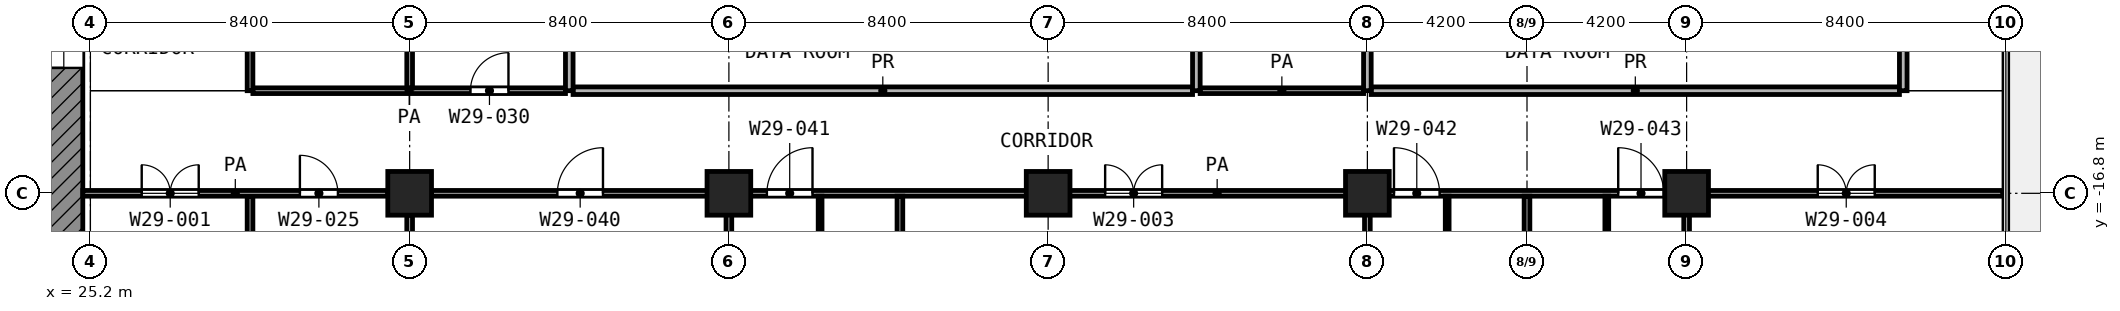
"""IFC4 building model, lengths in metres.
Left out: names, types, materials, properties, quantities, classifications, styles, units other than length and angle.
Written with IfcOpenShell. Run it as: python <this file> out.ifc"""

import sys

from ifc_helpers import new_model, si_unit, direction, frame, frame_2d, origin, origin_2d, place, context, subcontext, project, spatial, rectangle, extrude, element, fill, save


model = new_model("IFC4")
c1 = context("Model", 3, precision=1e-05, world=origin(), true_north=direction((0.0, 1.0)))
c2 = subcontext(c1, "Body", "Model", "MODEL_VIEW")
j1 = project(units=[si_unit("LENGTHUNIT", "METRE"), si_unit("PLANEANGLEUNIT", "RADIAN")], contexts=[c1])
p1 = place(None, origin())
s1 = spatial("IfcSite", under=j1, at=p1, CompositionType="ELEMENT")
p2 = place(p1, origin())
s2 = spatial("IfcBuilding", under=s1, at=p2, CompositionType="ELEMENT")
p3 = place(p2, frame((0.0, 0.0, 149.2)))
s3 = spatial("IfcBuildingStorey", under=s2, at=p3, CompositionType="ELEMENT", Elevation=149.2)
for number, where, z_axis, x_axis in (
    (1, (33.6, -16.8, 0.0), (0.0, 0.0, 1.0), (1.0, 0.0, 0.0)),
    (2, (42.0, -16.8, 0.0), (0.0, 0.0, 1.0), (1.0, 0.0, 0.0)),
    (3, (50.4, -16.8, 0.0), (0.0, 0.0, 1.0), (1.0, 0.0, 0.0)),
    (4, (58.8, -16.8, 0.0), (0.0, 0.0, 1.0), (1.0, 0.0, 0.0)),
    (5, (67.2, -16.8, 0.0), (0.0, 0.0, 1.0), (1.0, 0.0, 0.0)),
):
    element("IfcColumn", number, at=place(p3, frame(where, z_axis=z_axis, x_axis=x_axis)), inside=s3, PredefinedType="COLUMN", context=c2, shape_type="SweptSolid", body=[
        extrude(rectangle(XDim=1.15, YDim=1.15, at=origin_2d()), origin(), (0.0, 0.0, 1.0), 4.2),
    ])
p4 = place(p3, frame((24.5, -24.0, 0.0), z_axis=(0.0, 0.0, 1.0), x_axis=(0.0, 1.0, 0.0)))
e6 = element("IfcWall", 6, at=p4, inside=s3, PredefinedType="SHEAR", context=c2, shape_type="SweptSolid", body=[
    extrude(rectangle(XDim=18.6, YDim=1.0, at=frame_2d((9.3, 0.0))), origin(), (0.0, 0.0, 1.0), 3.7),
])
p5 = place(p4, frame((10.5, 0.0, 0.0)))
e7 = element("IfcOpeningElement", 7, at=p5, cuts=e6, PredefinedType="OPENING", context=c2, shape_type="SweptSolid", body=[
    extrude(rectangle(XDim=1.8, YDim=2.1, at=frame_2d((0.9, 1.05))), frame((0.0, 0.51, 0.0), z_axis=(0.0, -1.0, 0.0), x_axis=(1.0, 0.0, 0.0)), (0.0, 0.0, 1.0), 1.02),
])
for number, where, z_axis, x_axis in (
    (8, (44.4, -19.5, 0.0), (0.0, 0.0, 1.0), (0.0, 1.0, 0.0)),
    (9, (60.9, -19.5, 0.0), (0.0, 0.0, 1.0), (0.0, 1.0, 0.0)),
    (10, (65.1, -19.5, 0.0), (0.0, 0.0, 1.0), (0.0, 1.0, 0.0)),
):
    element("IfcWall", number, at=place(p3, frame(where, z_axis=z_axis, x_axis=x_axis)), inside=s3, PredefinedType="PARTITIONING", context=c2, shape_type="SweptSolid", body=[
        extrude(rectangle(XDim=2.625, YDim=0.1, at=frame_2d((1.312, 0.0))), origin(), (0.0, 0.0, 1.0), 3.7),
    ])
p6 = place(p3, frame((25.0, -16.8, 0.0), z_axis=(0.0, 0.0, 1.0), x_axis=(1.0, 0.0, 0.0)))
e11 = element("IfcWall", 11, at=p6, inside=s3, PredefinedType="PARTITIONING", context=c2, shape_type="SweptSolid", body=[
    extrude(rectangle(XDim=8.025, YDim=0.15, at=frame_2d((4.012, 0.0))), origin(), (0.0, 0.0, 1.0), 3.7),
])
p7 = place(p6, frame((1.55, 0.0, 0.0)))
e12 = element("IfcOpeningElement", 12, at=p7, cuts=e11, PredefinedType="OPENING", context=c2, shape_type="SweptSolid", body=[
    extrude(rectangle(XDim=1.5, YDim=2.1, at=frame_2d((0.75, 1.05))), frame((0.0, 0.085, 0.0), z_axis=(0.0, -1.0, 0.0), x_axis=(1.0, 0.0, 0.0)), (0.0, 0.0, 1.0), 0.17),
])
p8 = place(p6, frame((5.712, 0.0, 0.0)))
e13 = element("IfcOpeningElement", 13, at=p8, cuts=e11, PredefinedType="OPENING", context=c2, shape_type="SweptSolid", body=[
    extrude(rectangle(XDim=1.0, YDim=2.1, at=frame_2d((0.5, 1.05))), frame((0.0, 0.085, 0.0), z_axis=(0.0, -1.0, 0.0), x_axis=(1.0, 0.0, 0.0)), (0.0, 0.0, 1.0), 0.17),
])
p9 = place(p3, frame((34.175, -16.8, 0.0), z_axis=(0.0, 0.0, 1.0), x_axis=(1.0, 0.0, 0.0)))
e14 = element("IfcWall", 14, at=p9, inside=s3, PredefinedType="PARTITIONING", context=c2, shape_type="SweptSolid", body=[
    extrude(rectangle(XDim=41.345, YDim=0.15, at=frame_2d((20.672, 0.0))), origin(), (0.0, 0.0, 1.0), 3.7),
])
p10 = place(p9, frame((3.312, 0.0, 0.0)))
e15 = element("IfcOpeningElement", 15, at=p10, cuts=e14, PredefinedType="OPENING", context=c2, shape_type="SweptSolid", body=[
    extrude(rectangle(XDim=1.2, YDim=2.1, at=frame_2d((0.6, 1.05))), frame((0.0, 0.085, 0.0), z_axis=(0.0, -1.0, 0.0), x_axis=(1.0, 0.0, 0.0)), (0.0, 0.0, 1.0), 0.17),
])
p11 = place(p9, frame((8.825, 0.0, 0.0)))
e16 = element("IfcOpeningElement", 16, at=p11, cuts=e14, PredefinedType="OPENING", context=c2, shape_type="SweptSolid", body=[
    extrude(rectangle(XDim=1.2, YDim=2.1, at=frame_2d((0.6, 1.05))), frame((0.0, 0.085, 0.0), z_axis=(0.0, -1.0, 0.0), x_axis=(1.0, 0.0, 0.0)), (0.0, 0.0, 1.0), 0.17),
])
p12 = place(p9, frame((17.725, 0.0, 0.0)))
e17 = element("IfcOpeningElement", 17, at=p12, cuts=e14, PredefinedType="OPENING", context=c2, shape_type="SweptSolid", body=[
    extrude(rectangle(XDim=1.5, YDim=2.1, at=frame_2d((0.75, 1.05))), frame((0.0, 0.085, 0.0), z_axis=(0.0, -1.0, 0.0), x_axis=(1.0, 0.0, 0.0)), (0.0, 0.0, 1.0), 0.17),
])
p13 = place(p9, frame((25.325, 0.0, 0.0)))
e18 = element("IfcOpeningElement", 18, at=p13, cuts=e14, PredefinedType="OPENING", context=c2, shape_type="SweptSolid", body=[
    extrude(rectangle(XDim=1.2, YDim=2.1, at=frame_2d((0.6, 1.05))), frame((0.0, 0.085, 0.0), z_axis=(0.0, -1.0, 0.0), x_axis=(1.0, 0.0, 0.0)), (0.0, 0.0, 1.0), 0.17),
])
p14 = place(p9, frame((31.225, 0.0, 0.0)))
e19 = element("IfcOpeningElement", 19, at=p14, cuts=e14, PredefinedType="OPENING", context=c2, shape_type="SweptSolid", body=[
    extrude(rectangle(XDim=1.2, YDim=2.1, at=frame_2d((0.6, 1.05))), frame((0.0, 0.085, 0.0), z_axis=(0.0, -1.0, 0.0), x_axis=(1.0, 0.0, 0.0)), (0.0, 0.0, 1.0), 0.17),
])
p15 = place(p9, frame((36.475, 0.0, 0.0)))
e20 = element("IfcOpeningElement", 20, at=p15, cuts=e14, PredefinedType="OPENING", context=c2, shape_type="SweptSolid", body=[
    extrude(rectangle(XDim=1.5, YDim=2.1, at=frame_2d((0.75, 1.05))), frame((0.0, 0.085, 0.0), z_axis=(0.0, -1.0, 0.0), x_axis=(1.0, 0.0, 0.0)), (0.0, 0.0, 1.0), 0.17),
])
p16 = place(p3, frame((29.475, -14.1, 0.0), z_axis=(0.0, 0.0, 1.0), x_axis=(1.0, 0.0, 0.0)))
e21 = element("IfcWall", 21, at=p16, inside=s3, PredefinedType="PARTITIONING", context=c2, shape_type="SweptSolid", body=[
    extrude(rectangle(XDim=8.225, YDim=0.15, at=frame_2d((4.112, 0.0))), origin(), (0.0, 0.0, 1.0), 3.7),
])
p17 = place(p16, frame((5.725, 0.0, 0.0)))
e22 = element("IfcOpeningElement", 22, at=p17, cuts=e21, PredefinedType="OPENING", context=c2, shape_type="SweptSolid", body=[
    extrude(rectangle(XDim=1.0, YDim=2.1, at=frame_2d((0.5, 1.05))), frame((0.0, 0.085, 0.0), z_axis=(0.0, -1.0, 0.0), x_axis=(1.0, 0.0, 0.0)), (0.0, 0.0, 1.0), 0.17),
])
p18 = place(p3, frame((54.4, -14.1, 0.0), z_axis=(0.0, 0.0, 1.0), x_axis=(1.0, 0.0, 0.0)))
e23 = element("IfcWall", 23, at=p18, inside=s3, PredefinedType="PARTITIONING", context=c2, shape_type="SweptSolid", body=[
    extrude(rectangle(XDim=4.3, YDim=0.15, at=frame_2d((2.15, 0.0))), origin(), (0.0, 0.0, 1.0), 3.7),
])
p19 = place(p3, frame((29.4, -25.2, 0.0), z_axis=(0.0, 0.0, 1.0), x_axis=(0.0, 1.0, 0.0)))
e24 = element("IfcWall", 24, at=p19, inside=s3, PredefinedType="PARTITIONING", context=c2, shape_type="SweptSolid", body=[
    extrude(rectangle(XDim=8.325, YDim=0.15, at=frame_2d((4.163, 0.0))), origin(), (0.0, 0.0, 1.0), 3.7),
])
p20 = place(p3, frame((29.4, -14.1, 0.0), z_axis=(0.0, 0.0, 1.0), x_axis=(0.0, 1.0, 0.0)))
e25 = element("IfcWall", 25, at=p20, inside=s3, PredefinedType="PARTITIONING", context=c2, shape_type="SweptSolid", body=[
    extrude(rectangle(XDim=3.0, YDim=0.15, at=frame_2d((1.5, 0.0))), origin(), (0.0, 0.0, 1.0), 3.7),
])
p21 = place(p3, frame((33.6, -25.12, 0.0), z_axis=(0.0, 0.0, 1.0), x_axis=(0.0, 1.0, 0.0)))
e26 = element("IfcWall", 26, at=p21, inside=s3, PredefinedType="PARTITIONING", context=c2, shape_type="SweptSolid", body=[
    extrude(rectangle(XDim=7.745, YDim=0.15, at=frame_2d((3.873, 0.0))), origin(), (0.0, 0.0, 1.0), 3.7),
])
p22 = place(p3, frame((33.6, -14.025, 0.0), z_axis=(0.0, 0.0, 1.0), x_axis=(0.0, 1.0, 0.0)))
e27 = element("IfcWall", 27, at=p22, inside=s3, PredefinedType="PARTITIONING", context=c2, shape_type="SweptSolid", body=[
    extrude(rectangle(XDim=2.85, YDim=0.15, at=frame_2d((1.425, 0.0))), origin(), (0.0, 0.0, 1.0), 3.7),
])
for number, where, z_axis, x_axis in (
    (28, (42.0, -25.12, 0.0), (0.0, 0.0, 1.0), (0.0, 1.0, 0.0)),
    (29, (46.5, -25.12, 0.0), (0.0, 0.0, 1.0), (0.0, 1.0, 0.0)),
    (30, (58.8, -25.12, 0.0), (0.0, 0.0, 1.0), (0.0, 1.0, 0.0)),
    (31, (63.0, -25.12, 0.0), (0.0, 0.0, 1.0), (0.0, 1.0, 0.0)),
    (32, (67.2, -25.12, 0.0), (0.0, 0.0, 1.0), (0.0, 1.0, 0.0)),
):
    element("IfcWall", number, at=place(p3, frame(where, z_axis=z_axis, x_axis=x_axis)), inside=s3, PredefinedType="PARTITIONING", context=c2, shape_type="SweptSolid", body=[
        extrude(rectangle(XDim=8.245, YDim=0.15, at=frame_2d((4.123, 0.0))), origin(), (0.0, 0.0, 1.0), 3.7),
    ])
p23 = place(p3, frame((37.9, -14.1, 0.0), z_axis=(0.0, 0.0, 1.0), x_axis=(1.0, 0.0, 0.0)))
e33 = element("IfcWall", 33, at=p23, inside=s3, PredefinedType="PARTITIONING", context=c2, shape_type="SweptSolid", body=[
    extrude(rectangle(XDim=16.3, YDim=0.2, at=frame_2d((8.15, 0.0))), origin(), (0.0, 0.0, 1.0), 3.7),
])
p24 = place(p3, frame((58.9, -14.1, 0.0), z_axis=(0.0, 0.0, 1.0), x_axis=(1.0, 0.0, 0.0)))
e34 = element("IfcWall", 34, at=p24, inside=s3, PredefinedType="PARTITIONING", context=c2, shape_type="SweptSolid", body=[
    extrude(rectangle(XDim=13.9, YDim=0.2, at=frame_2d((6.95, 0.0))), origin(), (0.0, 0.0, 1.0), 3.7),
])
for number, where, z_axis, x_axis in (
    (35, (37.8, -14.1, 0.0), (0.0, 0.0, 1.0), (0.0, 1.0, 0.0)),
    (36, (54.3, -14.1, 0.0), (0.0, 0.0, 1.0), (0.0, 1.0, 0.0)),
    (37, (58.8, -14.1, 0.0), (0.0, 0.0, 1.0), (0.0, 1.0, 0.0)),
    (38, (72.9, -14.1, 0.0), (0.0, 0.0, 1.0), (0.0, 1.0, 0.0)),
):
    element("IfcWall", number, at=place(p3, frame(where, z_axis=z_axis, x_axis=x_axis)), inside=s3, PredefinedType="PARTITIONING", context=c2, shape_type="SweptSolid", body=[
        extrude(rectangle(XDim=3.0, YDim=0.2, at=frame_2d((1.5, 0.0))), origin(), (0.0, 0.0, 1.0), 3.7),
    ])
p25 = place(p5, origin())
e39 = element("IfcDoor", 39, at=p25, inside=s3, OperationType="DOUBLE_DOOR_SINGLE_SWING", PredefinedType="DOOR", context=c2, shape_type="SweptSolid", body=[
    extrude(rectangle(XDim=1.8, YDim=2.1, at=frame_2d((0.9, 1.05))), frame((0.0, 0.025, 0.0), z_axis=(0.0, -1.0, 0.0), x_axis=(1.0, 0.0, 0.0)), (0.0, 0.0, 1.0), 0.05),
])
fill(e7, e39)
p26 = place(p7, origin())
e40 = element("IfcDoor", 40, at=p26, inside=s3, OperationType="DOUBLE_DOOR_SINGLE_SWING", PredefinedType="DOOR", context=c2, shape_type="SweptSolid", body=[
    extrude(rectangle(XDim=1.5, YDim=2.1, at=frame_2d((0.75, 1.05))), frame((0.0, 0.025, 0.0), z_axis=(0.0, -1.0, 0.0), x_axis=(1.0, 0.0, 0.0)), (0.0, 0.0, 1.0), 0.05),
])
fill(e12, e40)
p27 = place(p17, origin())
e41 = element("IfcDoor", 41, at=p27, inside=s3, OperationType="SINGLE_SWING_RIGHT", PredefinedType="DOOR", context=c2, shape_type="SweptSolid", body=[
    extrude(rectangle(XDim=1.0, YDim=2.1, at=frame_2d((0.5, 1.05))), frame((0.0, 0.025, 0.0), z_axis=(0.0, -1.0, 0.0), x_axis=(1.0, 0.0, 0.0)), (0.0, 0.0, 1.0), 0.05),
])
fill(e22, e41)
p28 = place(p8, origin())
e42 = element("IfcDoor", 42, at=p28, inside=s3, OperationType="SINGLE_SWING_LEFT", PredefinedType="DOOR", context=c2, shape_type="SweptSolid", body=[
    extrude(rectangle(XDim=1.0, YDim=2.1, at=frame_2d((0.5, 1.05))), frame((0.0, 0.025, 0.0), z_axis=(0.0, -1.0, 0.0), x_axis=(1.0, 0.0, 0.0)), (0.0, 0.0, 1.0), 0.05),
])
fill(e13, e42)
p29 = place(p10, origin())
e43 = element("IfcDoor", 43, at=p29, inside=s3, OperationType="SINGLE_SWING_RIGHT", PredefinedType="DOOR", context=c2, shape_type="SweptSolid", body=[
    extrude(rectangle(XDim=1.2, YDim=2.1, at=frame_2d((0.6, 1.05))), frame((0.0, 0.025, 0.0), z_axis=(0.0, -1.0, 0.0), x_axis=(1.0, 0.0, 0.0)), (0.0, 0.0, 1.0), 0.05),
])
fill(e15, e43)
p30 = place(p11, origin())
e44 = element("IfcDoor", 44, at=p30, inside=s3, OperationType="SINGLE_SWING_RIGHT", PredefinedType="DOOR", context=c2, shape_type="SweptSolid", body=[
    extrude(rectangle(XDim=1.2, YDim=2.1, at=frame_2d((0.6, 1.05))), frame((0.0, 0.025, 0.0), z_axis=(0.0, -1.0, 0.0), x_axis=(1.0, 0.0, 0.0)), (0.0, 0.0, 1.0), 0.05),
])
fill(e16, e44)
p31 = place(p12, origin())
e45 = element("IfcDoor", 45, at=p31, inside=s3, OperationType="DOUBLE_DOOR_SINGLE_SWING", PredefinedType="DOOR", context=c2, shape_type="SweptSolid", body=[
    extrude(rectangle(XDim=1.5, YDim=2.1, at=frame_2d((0.75, 1.05))), frame((0.0, 0.025, 0.0), z_axis=(0.0, -1.0, 0.0), x_axis=(1.0, 0.0, 0.0)), (0.0, 0.0, 1.0), 0.05),
])
fill(e17, e45)
p32 = place(p13, origin())
e46 = element("IfcDoor", 46, at=p32, inside=s3, OperationType="SINGLE_SWING_LEFT", PredefinedType="DOOR", context=c2, shape_type="SweptSolid", body=[
    extrude(rectangle(XDim=1.2, YDim=2.1, at=frame_2d((0.6, 1.05))), frame((0.0, 0.025, 0.0), z_axis=(0.0, -1.0, 0.0), x_axis=(1.0, 0.0, 0.0)), (0.0, 0.0, 1.0), 0.05),
])
fill(e18, e46)
p33 = place(p14, origin())
e47 = element("IfcDoor", 47, at=p33, inside=s3, OperationType="SINGLE_SWING_LEFT", PredefinedType="DOOR", context=c2, shape_type="SweptSolid", body=[
    extrude(rectangle(XDim=1.2, YDim=2.1, at=frame_2d((0.6, 1.05))), frame((0.0, 0.025, 0.0), z_axis=(0.0, -1.0, 0.0), x_axis=(1.0, 0.0, 0.0)), (0.0, 0.0, 1.0), 0.05),
])
fill(e19, e47)
p34 = place(p15, origin())
e48 = element("IfcDoor", 48, at=p34, inside=s3, OperationType="DOUBLE_DOOR_SINGLE_SWING", PredefinedType="DOOR", context=c2, shape_type="SweptSolid", body=[
    extrude(rectangle(XDim=1.5, YDim=2.1, at=frame_2d((0.75, 1.05))), frame((0.0, 0.025, 0.0), z_axis=(0.0, -1.0, 0.0), x_axis=(1.0, 0.0, 0.0)), (0.0, 0.0, 1.0), 0.05),
])
fill(e20, e48)
save(model, sys.argv[1])
